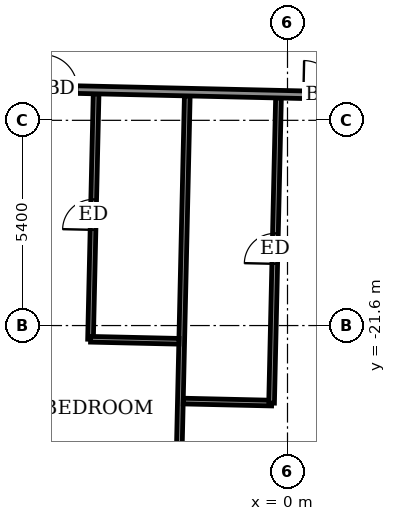
"""IFC4 building model, lengths in metres.
Left out: names, types, materials, properties, quantities, classifications, styles, units other than length and angle.
Written with IfcOpenShell. Run it as: python <this file> out.ifc"""

import sys

from ifc_helpers import new_model, si_unit, direction, frame, frame_2d, origin, place, context, subcontext, project, spatial, rectangle, extrude, element, fill, save


model = new_model("IFC4")
c1 = context("Model", 3, precision=1e-05, world=origin(), true_north=direction((0.0, 1.0)))
c2 = subcontext(c1, "Body", "Model", "MODEL_VIEW")
j1 = project(units=[si_unit("LENGTHUNIT", "METRE"), si_unit("PLANEANGLEUNIT", "RADIAN")], contexts=[c1])
p1 = place(None, origin())
s1 = spatial("IfcSite", under=j1, at=p1, CompositionType="ELEMENT")
p2 = place(p1, origin())
s2 = spatial("IfcBuilding", under=s1, at=p2, CompositionType="ELEMENT")
p3 = place(p2, frame((0.0, 0.0, 71.1)))
s3 = spatial("IfcBuildingStorey", under=s2, at=p3, CompositionType="ELEMENT", Elevation=71.1)
p4 = place(p3, frame((-2.911, -27.655, 0.0), z_axis=(0.0, 0.0, 1.0), x_axis=(0.02263616477, 0.999743769195, 0.0)))
e1 = element("IfcWall", 1, at=p4, inside=s3, PredefinedType="PARTITIONING", context=c2, shape_type="SweptSolid", body=[
    extrude(rectangle(XDim=12.101, YDim=0.15, at=frame_2d((6.051, 0.0))), origin(), (0.0, 0.0, 1.0), 3.05),
])
p5 = place(p3, frame((-2.742, -23.587, 0.0), z_axis=(0.0, 0.0, 1.0), x_axis=(0.999740478815, -0.022781023197, 0.0)))
e2 = element("IfcWall", 2, at=p5, inside=s3, PredefinedType="PARTITIONING", context=c2, shape_type="SweptSolid", body=[
    extrude(rectangle(XDim=2.325, YDim=0.15, at=frame_2d((1.163, 0.0))), origin(), (0.0, 0.0, 1.0), 3.05),
])
p6 = place(p3, frame((-0.419, -23.64, 0.0), z_axis=(0.0, 0.0, 1.0), x_axis=(0.022650959747, 0.999743434098, 0.0)))
e3 = element("IfcWall", 3, at=p6, inside=s3, PredefinedType="PARTITIONING", context=c2, shape_type="SweptSolid", body=[
    extrude(rectangle(XDim=8.03, YDim=0.15, at=frame_2d((4.015, 0.0))), origin(), (0.0, 0.0, 1.0), 3.05),
])
p7 = place(p6, frame((3.665, 0.0, 0.0)))
e4 = element("IfcOpeningElement", 4, at=p7, cuts=e3, PredefinedType="OPENING", context=c2, shape_type="SweptSolid", body=[
    extrude(rectangle(XDim=0.8, YDim=2.1, at=frame_2d((0.4, 1.05))), frame((0.0, 0.085, 0.0), z_axis=(0.0, -1.0, 0.0), x_axis=(1.0, 0.0, 0.0)), (0.0, 0.0, 1.0), 0.17),
])
p8 = place(p3, frame((-5.183, -21.961, 0.0), z_axis=(0.0, 0.0, 1.0), x_axis=(0.022790087107, 0.999740272236, 0.0)))
e5 = element("IfcWall", 5, at=p8, inside=s3, PredefinedType="PARTITIONING", context=c2, shape_type="SweptSolid", body=[
    extrude(rectangle(XDim=6.46, YDim=0.15, at=frame_2d((3.23, 0.0))), origin(), (0.0, 0.0, 1.0), 3.05),
])
p9 = place(p8, frame((2.88, 0.0, 0.0)))
e6 = element("IfcOpeningElement", 6, at=p9, cuts=e5, PredefinedType="OPENING", context=c2, shape_type="SweptSolid", body=[
    extrude(rectangle(XDim=0.8, YDim=2.1, at=frame_2d((0.4, 1.05))), frame((0.0, 0.085, 0.0), z_axis=(0.0, -1.0, 0.0), x_axis=(1.0, 0.0, 0.0)), (0.0, 0.0, 1.0), 0.17),
])
p10 = place(p3, frame((-5.181, -21.961, 0.0), z_axis=(0.0, 0.0, 1.0), x_axis=(0.999740478815, -0.022781023197, 0.0)))
e7 = element("IfcWall", 7, at=p10, inside=s3, PredefinedType="PARTITIONING", context=c2, shape_type="SweptSolid", body=[
    extrude(rectangle(XDim=2.325, YDim=0.15, at=frame_2d((1.163, 0.0))), origin(), (0.0, 0.0, 1.0), 3.05),
])
p11 = place(p3, frame((-26.151, -14.924, 0.0), z_axis=(0.0, 0.0, 1.0), x_axis=(0.999742750999, -0.022681089575, 0.0)))
e8 = element("IfcWall", 8, at=p11, inside=s3, PredefinedType="PARTITIONING", context=c2, shape_type="SweptSolid", body=[
    extrude(rectangle(XDim=54.886, YDim=0.2, at=frame_2d((27.443, 0.0))), origin(), (0.0, 0.0, 1.0), 3.05),
])
p12 = place(p11, frame((1.345, 0.0, 0.0)))
e9 = element("IfcOpeningElement", 9, at=p12, cuts=e8, PredefinedType="OPENING", context=c2, shape_type="SweptSolid", body=[
    extrude(rectangle(XDim=1.0, YDim=2.1, at=frame_2d((0.5, 1.05))), frame((0.0, 0.11, 0.0), z_axis=(0.0, -1.0, 0.0), x_axis=(1.0, 0.0, 0.0)), (0.0, 0.0, 1.0), 0.22),
])
p13 = place(p11, frame((8.35, 0.0, 0.0)))
e10 = element("IfcOpeningElement", 10, at=p13, cuts=e8, PredefinedType="OPENING", context=c2, shape_type="SweptSolid", body=[
    extrude(rectangle(XDim=0.9, YDim=2.1, at=frame_2d((0.45, 1.05))), frame((0.0, 0.11, 0.0), z_axis=(0.0, -1.0, 0.0), x_axis=(1.0, 0.0, 0.0)), (0.0, 0.0, 1.0), 0.22),
])
p14 = place(p11, frame((10.625, 0.0, 0.0)))
e11 = element("IfcOpeningElement", 11, at=p14, cuts=e8, PredefinedType="OPENING", context=c2, shape_type="SweptSolid", body=[
    extrude(rectangle(XDim=0.9, YDim=2.1, at=frame_2d((0.45, 1.05))), frame((0.0, 0.11, 0.0), z_axis=(0.0, -1.0, 0.0), x_axis=(1.0, 0.0, 0.0)), (0.0, 0.0, 1.0), 0.22),
])
p15 = place(p11, frame((17.675, 0.0, 0.0)))
e12 = element("IfcOpeningElement", 12, at=p15, cuts=e8, PredefinedType="OPENING", context=c2, shape_type="SweptSolid", body=[
    extrude(rectangle(XDim=0.9, YDim=2.1, at=frame_2d((0.45, 1.05))), frame((0.0, 0.11, 0.0), z_axis=(0.0, -1.0, 0.0), x_axis=(1.0, 0.0, 0.0)), (0.0, 0.0, 1.0), 0.22),
])
p16 = place(p11, frame((19.725, 0.0, 0.0)))
e13 = element("IfcOpeningElement", 13, at=p16, cuts=e8, PredefinedType="OPENING", context=c2, shape_type="SweptSolid", body=[
    extrude(rectangle(XDim=0.9, YDim=2.1, at=frame_2d((0.45, 1.05))), frame((0.0, 0.11, 0.0), z_axis=(0.0, -1.0, 0.0), x_axis=(1.0, 0.0, 0.0)), (0.0, 0.0, 1.0), 0.22),
])
p17 = place(p11, frame((26.575, 0.0, 0.0)))
e14 = element("IfcOpeningElement", 14, at=p17, cuts=e8, PredefinedType="OPENING", context=c2, shape_type="SweptSolid", body=[
    extrude(rectangle(XDim=0.9, YDim=2.1, at=frame_2d((0.45, 1.05))), frame((0.0, 0.11, 0.0), z_axis=(0.0, -1.0, 0.0), x_axis=(1.0, 0.0, 0.0)), (0.0, 0.0, 1.0), 0.22),
])
p18 = place(p11, frame((28.75, 0.0, 0.0)))
e15 = element("IfcOpeningElement", 15, at=p18, cuts=e8, PredefinedType="OPENING", context=c2, shape_type="SweptSolid", body=[
    extrude(rectangle(XDim=0.9, YDim=2.1, at=frame_2d((0.45, 1.05))), frame((0.0, 0.11, 0.0), z_axis=(0.0, -1.0, 0.0), x_axis=(1.0, 0.0, 0.0)), (0.0, 0.0, 1.0), 0.22),
])
p19 = place(p11, frame((35.875, 0.0, 0.0)))
e16 = element("IfcOpeningElement", 16, at=p19, cuts=e8, PredefinedType="OPENING", context=c2, shape_type="SweptSolid", body=[
    extrude(rectangle(XDim=0.9, YDim=2.1, at=frame_2d((0.45, 1.05))), frame((0.0, 0.11, 0.0), z_axis=(0.0, -1.0, 0.0), x_axis=(1.0, 0.0, 0.0)), (0.0, 0.0, 1.0), 0.22),
])
p20 = place(p11, frame((38.1, 0.0, 0.0)))
e17 = element("IfcOpeningElement", 17, at=p20, cuts=e8, PredefinedType="OPENING", context=c2, shape_type="SweptSolid", body=[
    extrude(rectangle(XDim=0.9, YDim=2.1, at=frame_2d((0.45, 1.05))), frame((0.0, 0.11, 0.0), z_axis=(0.0, -1.0, 0.0), x_axis=(1.0, 0.0, 0.0)), (0.0, 0.0, 1.0), 0.22),
])
p21 = place(p11, frame((45.125, 0.0, 0.0)))
e18 = element("IfcOpeningElement", 18, at=p21, cuts=e8, PredefinedType="OPENING", context=c2, shape_type="SweptSolid", body=[
    extrude(rectangle(XDim=0.9, YDim=2.1, at=frame_2d((0.45, 1.05))), frame((0.0, 0.11, 0.0), z_axis=(0.0, -1.0, 0.0), x_axis=(1.0, 0.0, 0.0)), (0.0, 0.0, 1.0), 0.22),
])
p22 = place(p11, frame((52.618, 0.0, 0.0)))
e19 = element("IfcOpeningElement", 19, at=p22, cuts=e8, PredefinedType="OPENING", context=c2, shape_type="SweptSolid", body=[
    extrude(rectangle(XDim=1.0, YDim=2.1, at=frame_2d((0.5, 1.05))), frame((0.0, 0.11, 0.0), z_axis=(0.0, -1.0, 0.0), x_axis=(1.0, 0.0, 0.0)), (0.0, 0.0, 1.0), 0.22),
])
p23 = place(p11, frame((47.575, 0.0, 0.0)))
e20 = element("IfcOpeningElement", 20, at=p23, cuts=e8, PredefinedType="OPENING", context=c2, shape_type="SweptSolid", body=[
    extrude(rectangle(XDim=0.9, YDim=2.1, at=frame_2d((0.45, 1.05))), frame((0.0, 0.11, 0.0), z_axis=(0.0, -1.0, 0.0), x_axis=(1.0, 0.0, 0.0)), (0.0, 0.0, 1.0), 0.22),
])
p24 = place(p16, origin())
e21 = element("IfcDoor", 21, at=p24, inside=s3, OperationType="SINGLE_SWING_RIGHT", PredefinedType="DOOR", context=c2, shape_type="SweptSolid", body=[
    extrude(rectangle(XDim=0.9, YDim=2.1, at=frame_2d((0.45, 1.05))), frame((0.0, 0.025, 0.0), z_axis=(0.0, -1.0, 0.0), x_axis=(1.0, 0.0, 0.0)), (0.0, 0.0, 1.0), 0.05),
])
fill(e13, e21)
p25 = place(p9, origin())
e22 = element("IfcDoor", 22, at=p25, inside=s3, OperationType="SINGLE_SWING_RIGHT", PredefinedType="DOOR", context=c2, shape_type="SweptSolid", body=[
    extrude(rectangle(XDim=0.8, YDim=2.1, at=frame_2d((0.4, 1.05))), frame((0.0, 0.025, 0.0), z_axis=(0.0, -1.0, 0.0), x_axis=(1.0, 0.0, 0.0)), (0.0, 0.0, 1.0), 0.05),
])
fill(e6, e22)
p26 = place(p17, origin())
e23 = element("IfcDoor", 23, at=p26, inside=s3, OperationType="SINGLE_SWING_LEFT", PredefinedType="DOOR", context=c2, shape_type="SweptSolid", body=[
    extrude(rectangle(XDim=0.9, YDim=2.1, at=frame_2d((0.45, 1.05))), frame((0.0, 0.025, 0.0), z_axis=(0.0, -1.0, 0.0), x_axis=(1.0, 0.0, 0.0)), (0.0, 0.0, 1.0), 0.05),
])
fill(e14, e23)
p27 = place(p7, origin())
e24 = element("IfcDoor", 24, at=p27, inside=s3, OperationType="SINGLE_SWING_LEFT", PredefinedType="DOOR", context=c2, shape_type="SweptSolid", body=[
    extrude(rectangle(XDim=0.8, YDim=2.1, at=frame_2d((0.4, 1.05))), frame((0.0, 0.025, 0.0), z_axis=(0.0, -1.0, 0.0), x_axis=(1.0, 0.0, 0.0)), (0.0, 0.0, 1.0), 0.05),
])
fill(e4, e24)
save(model, sys.argv[1])
